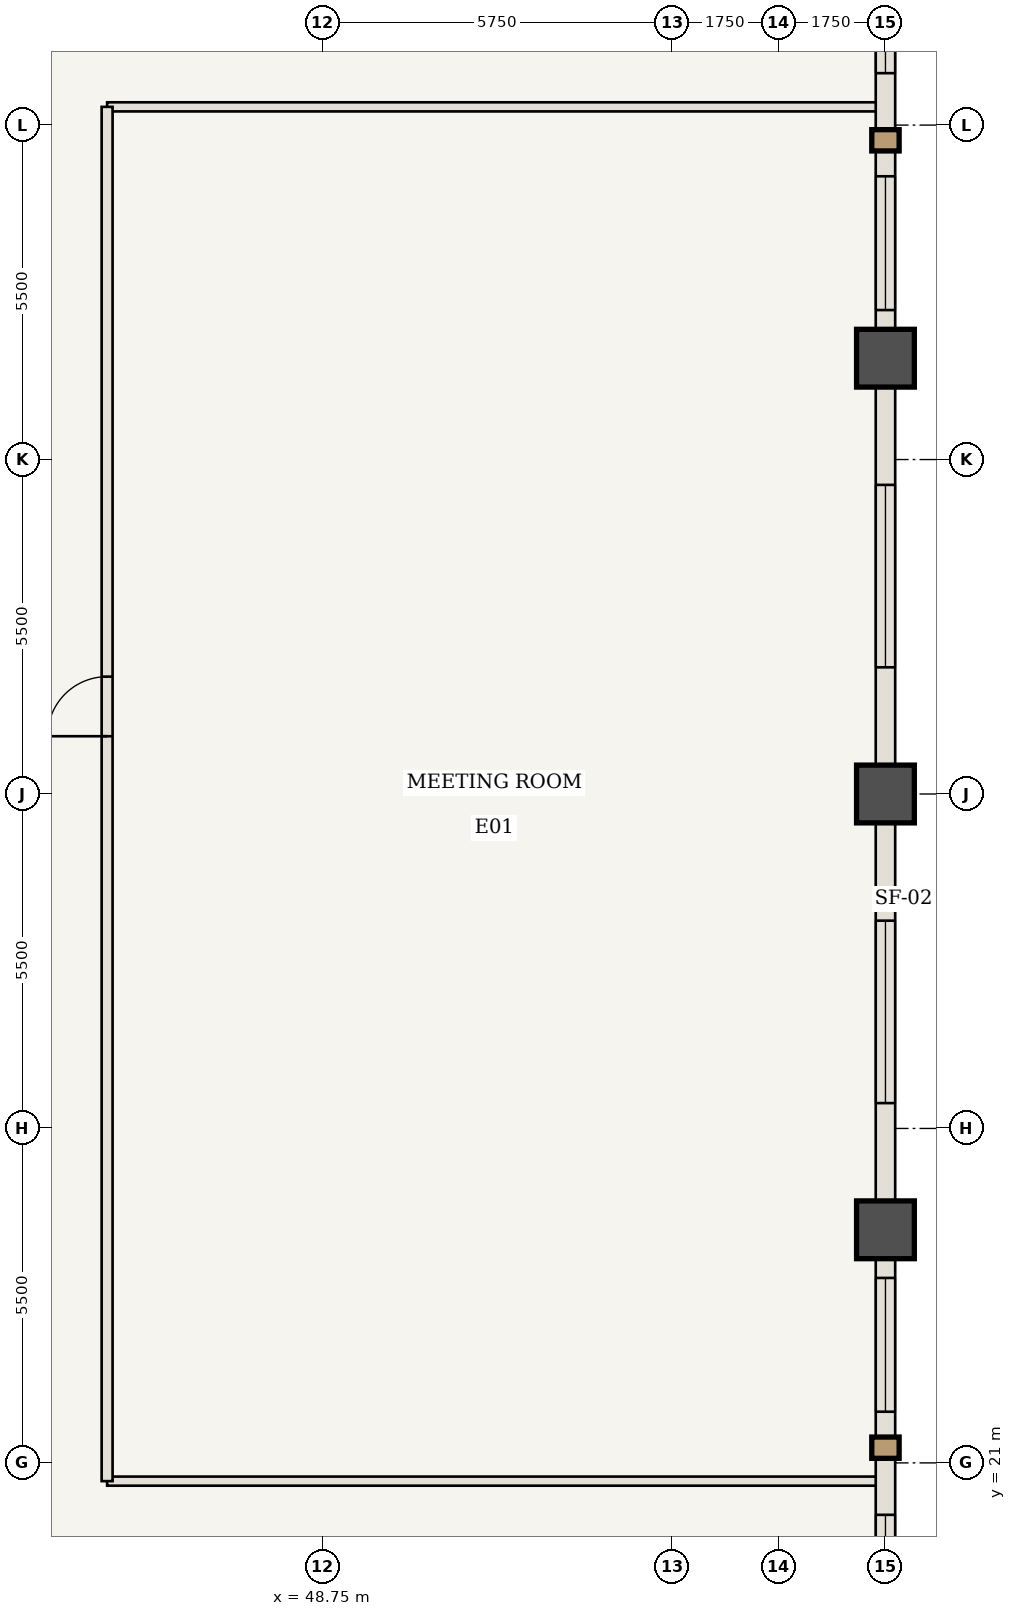
"""IFC4 building model, lengths in metres.
Left out: names, types, materials, properties, quantities, classifications, styles, units other than length and angle.
Written with IfcOpenShell. Run it as: python <this file> out.ifc"""

import sys

from ifc_helpers import new_model, si_unit, direction, frame, frame_2d, origin, origin_2d, place, context, subcontext, project, spatial, rectangle, extrude, element, fill, save


model = new_model("IFC4")
c1 = context("Model", 3, precision=1e-05, world=origin(), true_north=direction((0.0, 1.0)))
c2 = subcontext(c1, "Body", "Model", "MODEL_VIEW")
j1 = project(units=[si_unit("LENGTHUNIT", "METRE"), si_unit("PLANEANGLEUNIT", "RADIAN")], contexts=[c1])
p1 = place(None, origin())
s1 = spatial("IfcSite", under=j1, at=p1, CompositionType="ELEMENT")
p2 = place(p1, origin())
s2 = spatial("IfcBuilding", under=s1, at=p2, CompositionType="ELEMENT")
p3 = place(p2, frame((0.0, 0.0, 164.5)))
s3 = spatial("IfcBuildingStorey", under=s2, at=p3, CompositionType="ELEMENT", Elevation=164.5)
for number, where, z_axis, x_axis in (
    (1, (58.0, 24.833, 0.0), (0.0, 0.0, 1.0), (1.0, 0.0, 0.0)),
    (2, (58.0, 32.0, 0.0), (0.0, 0.0, 1.0), (1.0, 0.0, 0.0)),
    (3, (58.0, 39.167, 0.0), (0.0, 0.0, 1.0), (1.0, 0.0, 0.0)),
):
    element("IfcColumn", number, at=place(p3, frame(where, z_axis=z_axis, x_axis=x_axis)), inside=s3, PredefinedType="COLUMN", context=c2, shape_type="SweptSolid", body=[
        extrude(rectangle(XDim=0.95, YDim=0.95, at=origin_2d()), origin(), (0.0, 0.0, 1.0), 3.85),
    ])
for number, where, z_axis, x_axis in (
    (4, (45.2, 20.7, 0.0), (0.0, 0.0, 1.0), (1.0, 0.0, 0.0)),
    (5, (45.2, 43.3, 0.0), (0.0, 0.0, 1.0), (1.0, 0.0, 0.0)),
):
    element("IfcWall", number, at=place(p3, frame(where, z_axis=z_axis, x_axis=x_axis)), inside=s3, PredefinedType="STANDARD", context=c2, shape_type="SweptSolid", body=[
        extrude(rectangle(XDim=12.74, YDim=0.15, at=frame_2d((6.37, 0.0))), origin(), (0.0, 0.0, 1.0), 3.056),
    ])
p4 = place(p3, frame((45.2, 20.7, 0.0), z_axis=(0.0, 0.0, 1.0), x_axis=(0.0, 1.0, 0.0)))
e6 = element("IfcWall", 6, at=p4, inside=s3, PredefinedType="STANDARD", context=c2, shape_type="SweptSolid", body=[
    extrude(rectangle(XDim=22.6, YDim=0.18, at=frame_2d((11.3, 0.0))), origin(), (0.0, 0.0, 1.0), 3.685),
])
p5 = place(p4, frame((12.25, 0.0, 0.0)))
e7 = element("IfcOpeningElement", 7, at=p5, cuts=e6, PredefinedType="OPENING", context=c2, shape_type="SweptSolid", body=[
    extrude(rectangle(XDim=0.98, YDim=2.2, at=frame_2d((0.49, 1.1))), frame((0.0, 0.1, 0.0), z_axis=(0.0, -1.0, 0.0), x_axis=(1.0, 0.0, 0.0)), (0.0, 0.0, 1.0), 0.2),
])
p6 = place(p3, frame((58.0, 24.833, 0.0), z_axis=(0.0, 0.0, 1.0), x_axis=(0.0, -1.0, 0.0)))
e8 = element("IfcWall", 8, at=p6, inside=s3, PredefinedType="USERDEFINED", context=c2, shape_type="SweptSolid", body=[
    extrude(rectangle(XDim=7.167, YDim=0.32, at=frame_2d((3.583, 0.0))), origin(), (0.0, 0.0, 1.0), 2.885),
])
p7 = place(p6, frame((0.792, 0.0, 0.85)))
e9 = element("IfcOpeningElement", 9, at=p7, cuts=e8, PredefinedType="OPENING", context=c2, shape_type="SweptSolid", body=[
    extrude(rectangle(XDim=2.2, YDim=1.835, at=frame_2d((1.1, 0.917))), frame((0.0, 0.17, 0.0), z_axis=(0.0, -1.0, 0.0), x_axis=(1.0, 0.0, 0.0)), (0.0, 0.0, 1.0), 0.34),
])
p8 = place(p6, frame((4.688, 0.0, 0.85)))
e10 = element("IfcOpeningElement", 10, at=p8, cuts=e8, PredefinedType="OPENING", context=c2, shape_type="SweptSolid", body=[
    extrude(rectangle(XDim=1.6, YDim=1.835, at=frame_2d((0.8, 0.917))), frame((0.0, 0.17, 0.0), z_axis=(0.0, -1.0, 0.0), x_axis=(1.0, 0.0, 0.0)), (0.0, 0.0, 1.0), 0.34),
])
p9 = place(p3, frame((58.0, 32.0, 0.0), z_axis=(0.0, 0.0, 1.0), x_axis=(0.0, -1.0, 0.0)))
e11 = element("IfcWall", 11, at=p9, inside=s3, PredefinedType="USERDEFINED", context=c2, shape_type="SweptSolid", body=[
    extrude(rectangle(XDim=7.167, YDim=0.32, at=frame_2d((3.583, 0.0))), origin(), (0.0, 0.0, 1.0), 2.885),
])
p10 = place(p9, frame((2.083, 0.0, 0.85)))
e12 = element("IfcOpeningElement", 12, at=p10, cuts=e11, PredefinedType="OPENING", context=c2, shape_type="SweptSolid", body=[
    extrude(rectangle(XDim=3.0, YDim=1.835, at=frame_2d((1.5, 0.917))), frame((0.0, 0.17, 0.0), z_axis=(0.0, -1.0, 0.0), x_axis=(1.0, 0.0, 0.0)), (0.0, 0.0, 1.0), 0.34),
])
p11 = place(p3, frame((58.0, 39.167, 0.0), z_axis=(0.0, 0.0, 1.0), x_axis=(0.0, -1.0, 0.0)))
e13 = element("IfcWall", 13, at=p11, inside=s3, PredefinedType="USERDEFINED", context=c2, shape_type="SweptSolid", body=[
    extrude(rectangle(XDim=7.167, YDim=0.32, at=frame_2d((3.583, 0.0))), origin(), (0.0, 0.0, 1.0), 2.885),
])
p12 = place(p11, frame((2.083, 0.0, 0.85)))
e14 = element("IfcOpeningElement", 14, at=p12, cuts=e13, PredefinedType="OPENING", context=c2, shape_type="SweptSolid", body=[
    extrude(rectangle(XDim=3.0, YDim=1.835, at=frame_2d((1.5, 0.917))), frame((0.0, 0.17, 0.0), z_axis=(0.0, -1.0, 0.0), x_axis=(1.0, 0.0, 0.0)), (0.0, 0.0, 1.0), 0.34),
])
p13 = place(p3, frame((58.0, 46.333, 0.0), z_axis=(0.0, 0.0, 1.0), x_axis=(0.0, -1.0, 0.0)))
e15 = element("IfcWall", 15, at=p13, inside=s3, PredefinedType="USERDEFINED", context=c2, shape_type="SweptSolid", body=[
    extrude(rectangle(XDim=7.167, YDim=0.32, at=frame_2d((3.583, 0.0))), origin(), (0.0, 0.0, 1.0), 2.885),
])
p14 = place(p13, frame((0.879, 0.0, 0.85)))
e16 = element("IfcOpeningElement", 16, at=p14, cuts=e15, PredefinedType="OPENING", context=c2, shape_type="SweptSolid", body=[
    extrude(rectangle(XDim=1.6, YDim=1.835, at=frame_2d((0.8, 0.917))), frame((0.0, 0.17, 0.0), z_axis=(0.0, -1.0, 0.0), x_axis=(1.0, 0.0, 0.0)), (0.0, 0.0, 1.0), 0.34),
])
p15 = place(p13, frame((4.175, 0.0, 0.85)))
e17 = element("IfcOpeningElement", 17, at=p15, cuts=e15, PredefinedType="OPENING", context=c2, shape_type="SweptSolid", body=[
    extrude(rectangle(XDim=2.2, YDim=1.835, at=frame_2d((1.1, 0.917))), frame((0.0, 0.17, 0.0), z_axis=(0.0, -1.0, 0.0), x_axis=(1.0, 0.0, 0.0)), (0.0, 0.0, 1.0), 0.34),
])
p16 = place(p5, origin())
e18 = element("IfcDoor", 18, at=p16, inside=s3, OperationType="SINGLE_SWING_LEFT", PredefinedType="DOOR", context=c2, shape_type="SweptSolid", body=[
    extrude(rectangle(XDim=0.98, YDim=2.2, at=frame_2d((0.49, 1.1))), frame((0.0, 0.025, 0.0), z_axis=(0.0, -1.0, 0.0), x_axis=(1.0, 0.0, 0.0)), (0.0, 0.0, 1.0), 0.05),
])
fill(e7, e18)
p17 = place(p7, origin())
e19 = element("IfcWindow", 19, at=p17, inside=s3, PartitioningType="SINGLE_PANEL", PredefinedType="WINDOW", context=c2, shape_type="SweptSolid", body=[
    extrude(rectangle(XDim=2.2, YDim=1.835, at=frame_2d((1.1, 0.917))), frame((0.0, 0.03, 0.0), z_axis=(0.0, -1.0, 0.0), x_axis=(1.0, 0.0, 0.0)), (0.0, 0.0, 1.0), 0.06),
])
fill(e9, e19)
p18 = place(p8, origin())
e20 = element("IfcWindow", 20, at=p18, inside=s3, PartitioningType="SINGLE_PANEL", PredefinedType="WINDOW", context=c2, shape_type="SweptSolid", body=[
    extrude(rectangle(XDim=1.6, YDim=1.835, at=frame_2d((0.8, 0.917))), frame((0.0, 0.03, 0.0), z_axis=(0.0, -1.0, 0.0), x_axis=(1.0, 0.0, 0.0)), (0.0, 0.0, 1.0), 0.06),
])
fill(e10, e20)
p19 = place(p10, origin())
e21 = element("IfcWindow", 21, at=p19, inside=s3, PartitioningType="SINGLE_PANEL", PredefinedType="WINDOW", context=c2, shape_type="SweptSolid", body=[
    extrude(rectangle(XDim=3.0, YDim=1.835, at=frame_2d((1.5, 0.917))), frame((0.0, 0.03, 0.0), z_axis=(0.0, -1.0, 0.0), x_axis=(1.0, 0.0, 0.0)), (0.0, 0.0, 1.0), 0.06),
])
fill(e12, e21)
p20 = place(p12, origin())
e22 = element("IfcWindow", 22, at=p20, inside=s3, PartitioningType="SINGLE_PANEL", PredefinedType="WINDOW", context=c2, shape_type="SweptSolid", body=[
    extrude(rectangle(XDim=3.0, YDim=1.835, at=frame_2d((1.5, 0.917))), frame((0.0, 0.03, 0.0), z_axis=(0.0, -1.0, 0.0), x_axis=(1.0, 0.0, 0.0)), (0.0, 0.0, 1.0), 0.06),
])
fill(e14, e22)
p21 = place(p14, origin())
e23 = element("IfcWindow", 23, at=p21, inside=s3, PartitioningType="SINGLE_PANEL", PredefinedType="WINDOW", context=c2, shape_type="SweptSolid", body=[
    extrude(rectangle(XDim=1.6, YDim=1.835, at=frame_2d((0.8, 0.917))), frame((0.0, 0.03, 0.0), z_axis=(0.0, -1.0, 0.0), x_axis=(1.0, 0.0, 0.0)), (0.0, 0.0, 1.0), 0.06),
])
fill(e16, e23)
p22 = place(p15, origin())
e24 = element("IfcWindow", 24, at=p22, inside=s3, PartitioningType="SINGLE_PANEL", PredefinedType="WINDOW", context=c2, shape_type="SweptSolid", body=[
    extrude(rectangle(XDim=2.2, YDim=1.835, at=frame_2d((1.1, 0.917))), frame((0.0, 0.03, 0.0), z_axis=(0.0, -1.0, 0.0), x_axis=(1.0, 0.0, 0.0)), (0.0, 0.0, 1.0), 0.06),
])
fill(e17, e24)
save(model, sys.argv[1])
